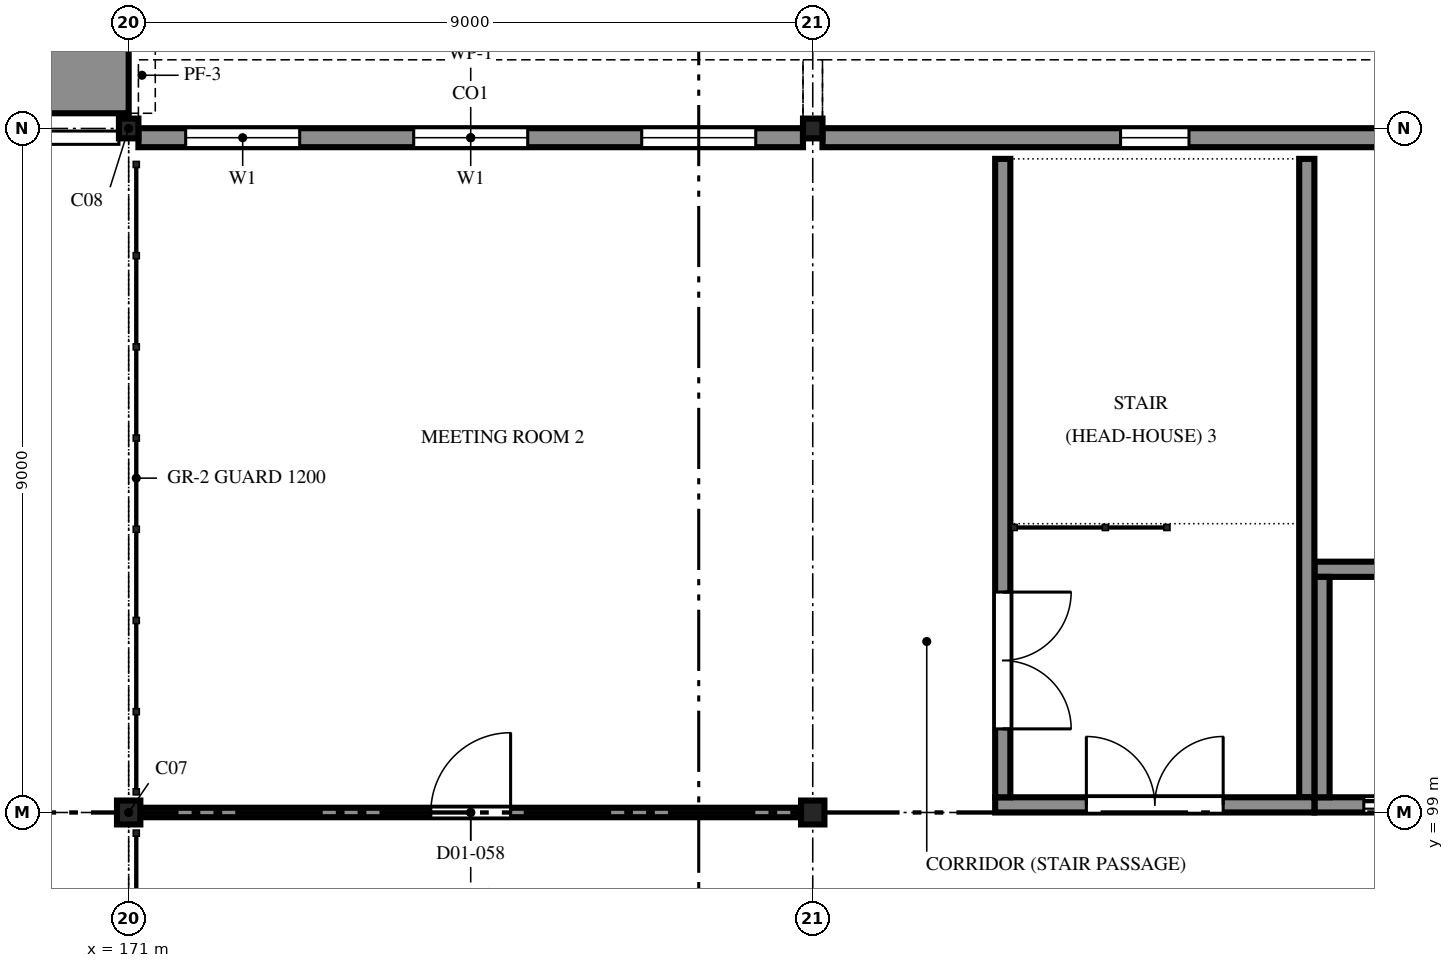
"""IFC4 building model, lengths in metres.
Left out: names, types, materials, properties, quantities, classifications, styles, units other than length and angle.
Written with IfcOpenShell. Run it as: python <this file> out.ifc"""

import sys

from ifc_helpers import new_model, si_unit, direction, frame, frame_2d, origin, origin_2d, place, context, subcontext, project, spatial, polyline, rectangle, i_section, outline, extrude, element, fill, save


model = new_model("IFC4")
c1 = context("Model", 3, precision=1e-05, world=origin(), true_north=direction((0.0, 1.0)))
c2 = subcontext(c1, "Body", "Model", "MODEL_VIEW")
j1 = project(units=[si_unit("LENGTHUNIT", "METRE"), si_unit("PLANEANGLEUNIT", "RADIAN")], contexts=[c1])
p1 = place(None, origin())
s1 = spatial("IfcSite", under=j1, at=p1, CompositionType="ELEMENT")
p2 = place(p1, origin())
s2 = spatial("IfcBuilding", under=s1, at=p2, CompositionType="ELEMENT")
p3 = place(p2, frame((0.0, 0.0, 7.5)))
s3 = spatial("IfcBuildingStorey", under=s2, at=p3, CompositionType="ELEMENT", Elevation=7.5)
p4 = place(p3, frame((171.0, 99.0, 0.0), z_axis=(0.0, 0.0, 1.0), x_axis=(1.0, 0.0, 0.0)))
e1 = element("IfcColumn", 1, at=p4, inside=s3, PredefinedType="COLUMN", context=c2, shape_type="SweptSolid", body=[
    extrude(i_section(OverallWidth=0.307, OverallDepth=0.314, WebThickness=0.012, FlangeThickness=0.019, FilletRadius=0.015, at=origin_2d()), origin(), (0.0, 0.0, 1.0), 4.2),
])
p5 = place(p3, frame((171.0, 108.0, 0.0), z_axis=(0.0, 0.0, 1.0), x_axis=(1.0, 0.0, 0.0)))
e2 = element("IfcColumn", 2, at=p5, inside=s3, PredefinedType="COLUMN", context=c2, shape_type="SweptSolid", body=[
    extrude(i_section(OverallWidth=0.256, OverallDepth=0.26, WebThickness=0.01, FlangeThickness=0.017, FilletRadius=0.013, at=origin_2d()), origin(), (0.0, 0.0, 1.0), 4.2),
])
p6 = place(p3, frame((180.0, 99.0, 0.0), z_axis=(0.0, 0.0, 1.0), x_axis=(1.0, 0.0, 0.0)))
e3 = element("IfcColumn", 3, at=p6, inside=s3, PredefinedType="COLUMN", context=c2, shape_type="SweptSolid", body=[
    extrude(i_section(OverallWidth=0.307, OverallDepth=0.314, WebThickness=0.012, FlangeThickness=0.019, FilletRadius=0.015, at=origin_2d()), origin(), (0.0, 0.0, 1.0), 4.2),
])
p7 = place(p3, frame((180.0, 108.0, 0.0), z_axis=(0.0, 0.0, 1.0), x_axis=(1.0, 0.0, 0.0)))
e4 = element("IfcColumn", 4, at=p7, inside=s3, PredefinedType="COLUMN", context=c2, shape_type="SweptSolid", body=[
    extrude(i_section(OverallWidth=0.256, OverallDepth=0.26, WebThickness=0.01, FlangeThickness=0.017, FilletRadius=0.013, at=origin_2d()), origin(), (0.0, 0.0, 1.0), 4.2),
])
p8 = place(p3, frame((171.128, 107.878, 0.0), z_axis=(0.0, 0.0, 1.0), x_axis=(1.0, 0.0, 0.0)))
e5 = element("IfcWall", 5, at=p8, inside=s3, PredefinedType="SOLIDWALL", context=c2, shape_type="SweptSolid", body=[
    extrude(rectangle(XDim=8.744, YDim=0.25, at=frame_2d((4.372, 0.0))), origin(), (0.0, 0.0, 1.0), 4.05),
])
p9 = place(p8, frame((0.622, 0.0, 0.9)))
e6 = element("IfcOpeningElement", 6, at=p9, cuts=e5, PredefinedType="OPENING", context=c2, shape_type="SweptSolid", body=[
    extrude(rectangle(XDim=1.5, YDim=2.4, at=frame_2d((0.75, 1.2))), frame((0.0, 0.135, 0.0), z_axis=(0.0, -1.0, 0.0), x_axis=(1.0, 0.0, 0.0)), (0.0, 0.0, 1.0), 0.27),
])
p10 = place(p8, frame((3.622, 0.0, 0.9)))
e7 = element("IfcOpeningElement", 7, at=p10, cuts=e5, PredefinedType="OPENING", context=c2, shape_type="SweptSolid", body=[
    extrude(rectangle(XDim=1.5, YDim=2.4, at=frame_2d((0.75, 1.2))), frame((0.0, 0.135, 0.0), z_axis=(0.0, -1.0, 0.0), x_axis=(1.0, 0.0, 0.0)), (0.0, 0.0, 1.0), 0.27),
])
p11 = place(p8, frame((6.622, 0.0, 0.9)))
e8 = element("IfcOpeningElement", 8, at=p11, cuts=e5, PredefinedType="OPENING", context=c2, shape_type="SweptSolid", body=[
    extrude(rectangle(XDim=1.5, YDim=2.4, at=frame_2d((0.75, 1.2))), frame((0.0, 0.135, 0.0), z_axis=(0.0, -1.0, 0.0), x_axis=(1.0, 0.0, 0.0)), (0.0, 0.0, 1.0), 0.27),
])
p12 = place(p3, frame((180.128, 107.878, 0.0), z_axis=(0.0, 0.0, 1.0), x_axis=(1.0, 0.0, 0.0)))
e9 = element("IfcWall", 9, at=p12, inside=s3, PredefinedType="SOLIDWALL", context=c2, shape_type="SweptSolid", body=[
    extrude(rectangle(XDim=8.744, YDim=0.25, at=frame_2d((4.372, 0.0))), origin(), (0.0, 0.0, 1.0), 4.05),
])
p13 = place(p12, frame((3.922, 0.0, 1.2)))
e10 = element("IfcOpeningElement", 10, at=p13, cuts=e9, PredefinedType="OPENING", context=c2, shape_type="SweptSolid", body=[
    extrude(rectangle(XDim=0.9, YDim=1.8, at=frame_2d((0.45, 0.9))), frame((0.0, 0.135, 0.0), z_axis=(0.0, -1.0, 0.0), x_axis=(1.0, 0.0, 0.0)), (0.0, 0.0, 1.0), 0.27),
])
p14 = place(p2, origin())
s4 = spatial("IfcBuildingStorey", under=s2, at=p14, CompositionType="ELEMENT", Elevation=0.0)
p15 = place(p14, frame((168.0, 108.7, -2.1), z_axis=(0.0, 0.0, 1.0), x_axis=(1.0, 0.0, 0.0)))
e11 = element("IfcWall", 11, at=p15, inside=s4, PredefinedType="SOLIDWALL", context=c2, shape_type="SweptSolid", body=[
    extrude(rectangle(XDim=3.0, YDim=1.0, at=frame_2d((1.5, 0.0))), origin(), (0.0, 0.0, 1.0), 26.1),
])
p16 = place(p3, frame((182.4, 99.1, -0.13), z_axis=(0.0, 0.0, 1.0), x_axis=(1.0, 0.0, 0.0)))
e12 = element("IfcWall", 12, at=p16, inside=s3, PredefinedType="SOLIDWALL", context=c2, shape_type="SweptSolid", body=[
    extrude(rectangle(XDim=4.2, YDim=0.2, at=frame_2d((2.1, 0.0))), origin(), (0.0, 0.0, 1.0), 3.72),
])
p17 = place(p16, frame((1.2, 0.0, 0.13)))
e13 = element("IfcOpeningElement", 13, at=p17, cuts=e12, PredefinedType="OPENING", context=c2, shape_type="SweptSolid", body=[
    extrude(rectangle(XDim=1.8, YDim=2.1, at=frame_2d((0.9, 1.05))), frame((0.0, 0.11, 0.0), z_axis=(0.0, -1.0, 0.0), x_axis=(1.0, 0.0, 0.0)), (0.0, 0.0, 1.0), 0.22),
])
p18 = place(p3, frame((182.5, 99.2, -0.13), z_axis=(0.0, 0.0, 1.0), x_axis=(0.0, 1.0, 0.0)))
e14 = element("IfcWall", 14, at=p18, inside=s3, PredefinedType="SOLIDWALL", context=c2, shape_type="SweptSolid", body=[
    extrude(rectangle(XDim=8.4, YDim=0.2, at=frame_2d((4.2, 0.0))), origin(), (0.0, 0.0, 1.0), 3.72),
])
p19 = place(p18, frame((0.9, 0.0, 0.13)))
e15 = element("IfcOpeningElement", 15, at=p19, cuts=e14, PredefinedType="OPENING", context=c2, shape_type="SweptSolid", body=[
    extrude(rectangle(XDim=1.8, YDim=2.1, at=frame_2d((0.9, 1.05))), frame((0.0, 0.11, 0.0), z_axis=(0.0, -1.0, 0.0), x_axis=(1.0, 0.0, 0.0)), (0.0, 0.0, 1.0), 0.22),
])
p20 = place(p3, frame((186.5, 99.2, -0.13), z_axis=(0.0, 0.0, 1.0), x_axis=(0.0, 1.0, 0.0)))
e16 = element("IfcWall", 16, at=p20, inside=s3, PredefinedType="SOLIDWALL", context=c2, shape_type="SweptSolid", body=[
    extrude(rectangle(XDim=8.4, YDim=0.2, at=frame_2d((4.2, 0.0))), origin(), (0.0, 0.0, 1.0), 3.72),
])
p21 = place(p3, frame((186.602, 99.1, 0.0), z_axis=(0.0, 0.0, 1.0), x_axis=(1.0, 0.0, 0.0)))
e17 = element("IfcWall", 17, at=p21, inside=s3, PredefinedType="SOLIDWALL", context=c2, shape_type="SweptSolid", body=[
    extrude(rectangle(XDim=2.398, YDim=0.2, at=frame_2d((1.199, 0.0))), origin(), (0.0, 0.0, 1.0), 3.516),
])
p22 = place(p21, frame((0.648, 0.0, 0.0)))
e18 = element("IfcOpeningElement", 18, at=p22, cuts=e17, PredefinedType="OPENING", context=c2, shape_type="SweptSolid", body=[
    extrude(rectangle(XDim=1.1, YDim=2.1, at=frame_2d((0.55, 1.05))), frame((0.0, 0.11, 0.0), z_axis=(0.0, -1.0, 0.0), x_axis=(1.0, 0.0, 0.0)), (0.0, 0.0, 1.0), 0.22),
])
p23 = place(p3, frame((186.602, 102.2, 0.0), z_axis=(0.0, 0.0, 1.0), x_axis=(1.0, 0.0, 0.0)))
e19 = element("IfcWall", 19, at=p23, inside=s3, PredefinedType="SOLIDWALL", context=c2, shape_type="SweptSolid", body=[
    extrude(rectangle(XDim=2.398, YDim=0.2, at=frame_2d((1.199, 0.0))), origin(), (0.0, 0.0, 1.0), 3.516),
])
p24 = place(p3, frame((186.7, 99.2, 0.0), z_axis=(0.0, 0.0, 1.0), x_axis=(0.0, 1.0, 0.0)))
e20 = element("IfcWall", 20, at=p24, inside=s3, PredefinedType="SOLIDWALL", context=c2, shape_type="SweptSolid", body=[
    extrude(rectangle(XDim=2.9, YDim=0.2, at=frame_2d((1.45, 0.0))), origin(), (0.0, 0.0, 1.0), 3.516),
])
p25 = place(p3, frame((171.154, 99.0, 0.0), z_axis=(0.0, 0.0, 1.0), x_axis=(1.0, 0.0, 0.0)))
e21 = element("IfcWall", 21, at=p25, inside=s3, PredefinedType="PARTITIONING", context=c2, shape_type="SweptSolid", body=[
    extrude(rectangle(XDim=8.692, YDim=0.125, at=frame_2d((4.346, 0.0))), origin(), (0.0, 0.0, 1.0), 3.307),
])
p26 = place(p25, frame((3.821, 0.0, 0.0)))
e22 = element("IfcOpeningElement", 22, at=p26, cuts=e21, PredefinedType="OPENING", context=c2, shape_type="SweptSolid", body=[
    extrude(rectangle(XDim=1.05, YDim=2.1, at=frame_2d((0.525, 1.05))), frame((0.0, 0.073, 0.0), z_axis=(0.0, -1.0, 0.0), x_axis=(1.0, 0.0, 0.0)), (0.0, 0.0, 1.0), 0.145),
])
p27 = place(p9, origin())
e23 = element("IfcWindow", 23, at=p27, inside=s3, PartitioningType="DOUBLE_PANEL_VERTICAL", PredefinedType="WINDOW", context=c2, shape_type="SweptSolid", body=[
    extrude(outline(polyline([(0.0, 0.0), (1.5, 0.0), (1.5, 2.4), (0.0, 2.4), (0.0, 0.0)]), holes=[polyline([(0.07, 0.07), (1.43, 0.07), (1.43, 2.33), (0.07, 2.33), (0.07, 0.07)])]), frame((0.0, 0.03, 0.0), z_axis=(0.0, -1.0, 0.0), x_axis=(1.0, 0.0, 0.0)), (0.0, 0.0, 1.0), 0.06),
    extrude(rectangle(XDim=0.04, YDim=2.26, at=frame_2d((0.75, 1.2))), frame((0.0, 0.022, 0.0), z_axis=(0.0, -1.0, 0.0), x_axis=(1.0, 0.0, 0.0)), (0.0, 0.0, 1.0), 0.044),
    extrude(outline(polyline([(0.07, 0.07), (0.73, 0.07), (0.73, 2.33), (0.07, 2.33), (0.07, 0.07)]), holes=[polyline([(0.1, 0.1), (0.7, 0.1), (0.7, 2.3), (0.1, 2.3), (0.1, 0.1)])]), frame((0.0, 0.022, 0.0), z_axis=(0.0, -1.0, 0.0), x_axis=(1.0, 0.0, 0.0)), (0.0, 0.0, 1.0), 0.045),
    extrude(rectangle(XDim=0.6, YDim=2.2, at=frame_2d((0.4, 1.2))), frame((0.0, 0.006, 0.0), z_axis=(0.0, -1.0, 0.0), x_axis=(1.0, 0.0, 0.0)), (0.0, 0.0, 1.0), 0.012),
    extrude(outline(polyline([(0.77, 0.07), (1.43, 0.07), (1.43, 2.33), (0.77, 2.33), (0.77, 0.07)]), holes=[polyline([(0.8, 0.1), (1.4, 0.1), (1.4, 2.3), (0.8, 2.3), (0.8, 0.1)])]), frame((0.0, 0.022, 0.0), z_axis=(0.0, -1.0, 0.0), x_axis=(1.0, 0.0, 0.0)), (0.0, 0.0, 1.0), 0.045),
    extrude(rectangle(XDim=0.6, YDim=2.2, at=frame_2d((1.1, 1.2))), frame((0.0, 0.006, 0.0), z_axis=(0.0, -1.0, 0.0), x_axis=(1.0, 0.0, 0.0)), (0.0, 0.0, 1.0), 0.012),
])
fill(e6, e23)
p28 = place(p10, origin())
e24 = element("IfcWindow", 24, at=p28, inside=s3, PartitioningType="DOUBLE_PANEL_VERTICAL", PredefinedType="WINDOW", context=c2, shape_type="SweptSolid", body=[
    extrude(outline(polyline([(0.0, 0.0), (1.5, 0.0), (1.5, 2.4), (0.0, 2.4), (0.0, 0.0)]), holes=[polyline([(0.07, 0.07), (1.43, 0.07), (1.43, 2.33), (0.07, 2.33), (0.07, 0.07)])]), frame((0.0, 0.03, 0.0), z_axis=(0.0, -1.0, 0.0), x_axis=(1.0, 0.0, 0.0)), (0.0, 0.0, 1.0), 0.06),
    extrude(rectangle(XDim=0.04, YDim=2.26, at=frame_2d((0.75, 1.2))), frame((0.0, 0.022, 0.0), z_axis=(0.0, -1.0, 0.0), x_axis=(1.0, 0.0, 0.0)), (0.0, 0.0, 1.0), 0.044),
    extrude(outline(polyline([(0.07, 0.07), (0.73, 0.07), (0.73, 2.33), (0.07, 2.33), (0.07, 0.07)]), holes=[polyline([(0.1, 0.1), (0.7, 0.1), (0.7, 2.3), (0.1, 2.3), (0.1, 0.1)])]), frame((0.0, 0.022, 0.0), z_axis=(0.0, -1.0, 0.0), x_axis=(1.0, 0.0, 0.0)), (0.0, 0.0, 1.0), 0.045),
    extrude(rectangle(XDim=0.6, YDim=2.2, at=frame_2d((0.4, 1.2))), frame((0.0, 0.006, 0.0), z_axis=(0.0, -1.0, 0.0), x_axis=(1.0, 0.0, 0.0)), (0.0, 0.0, 1.0), 0.012),
    extrude(outline(polyline([(0.77, 0.07), (1.43, 0.07), (1.43, 2.33), (0.77, 2.33), (0.77, 0.07)]), holes=[polyline([(0.8, 0.1), (1.4, 0.1), (1.4, 2.3), (0.8, 2.3), (0.8, 0.1)])]), frame((0.0, 0.022, 0.0), z_axis=(0.0, -1.0, 0.0), x_axis=(1.0, 0.0, 0.0)), (0.0, 0.0, 1.0), 0.045),
    extrude(rectangle(XDim=0.6, YDim=2.2, at=frame_2d((1.1, 1.2))), frame((0.0, 0.006, 0.0), z_axis=(0.0, -1.0, 0.0), x_axis=(1.0, 0.0, 0.0)), (0.0, 0.0, 1.0), 0.012),
])
fill(e7, e24)
p29 = place(p11, origin())
e25 = element("IfcWindow", 25, at=p29, inside=s3, PartitioningType="DOUBLE_PANEL_VERTICAL", PredefinedType="WINDOW", context=c2, shape_type="SweptSolid", body=[
    extrude(outline(polyline([(0.0, 0.0), (1.5, 0.0), (1.5, 2.4), (0.0, 2.4), (0.0, 0.0)]), holes=[polyline([(0.07, 0.07), (1.43, 0.07), (1.43, 2.33), (0.07, 2.33), (0.07, 0.07)])]), frame((0.0, 0.03, 0.0), z_axis=(0.0, -1.0, 0.0), x_axis=(1.0, 0.0, 0.0)), (0.0, 0.0, 1.0), 0.06),
    extrude(rectangle(XDim=0.04, YDim=2.26, at=frame_2d((0.75, 1.2))), frame((0.0, 0.022, 0.0), z_axis=(0.0, -1.0, 0.0), x_axis=(1.0, 0.0, 0.0)), (0.0, 0.0, 1.0), 0.044),
    extrude(outline(polyline([(0.07, 0.07), (0.73, 0.07), (0.73, 2.33), (0.07, 2.33), (0.07, 0.07)]), holes=[polyline([(0.1, 0.1), (0.7, 0.1), (0.7, 2.3), (0.1, 2.3), (0.1, 0.1)])]), frame((0.0, 0.022, 0.0), z_axis=(0.0, -1.0, 0.0), x_axis=(1.0, 0.0, 0.0)), (0.0, 0.0, 1.0), 0.045),
    extrude(rectangle(XDim=0.6, YDim=2.2, at=frame_2d((0.4, 1.2))), frame((0.0, 0.006, 0.0), z_axis=(0.0, -1.0, 0.0), x_axis=(1.0, 0.0, 0.0)), (0.0, 0.0, 1.0), 0.012),
    extrude(outline(polyline([(0.77, 0.07), (1.43, 0.07), (1.43, 2.33), (0.77, 2.33), (0.77, 0.07)]), holes=[polyline([(0.8, 0.1), (1.4, 0.1), (1.4, 2.3), (0.8, 2.3), (0.8, 0.1)])]), frame((0.0, 0.022, 0.0), z_axis=(0.0, -1.0, 0.0), x_axis=(1.0, 0.0, 0.0)), (0.0, 0.0, 1.0), 0.045),
    extrude(rectangle(XDim=0.6, YDim=2.2, at=frame_2d((1.1, 1.2))), frame((0.0, 0.006, 0.0), z_axis=(0.0, -1.0, 0.0), x_axis=(1.0, 0.0, 0.0)), (0.0, 0.0, 1.0), 0.012),
])
fill(e8, e25)
p30 = place(p13, origin())
e26 = element("IfcWindow", 26, at=p30, inside=s3, PartitioningType="SINGLE_PANEL", PredefinedType="WINDOW", context=c2, shape_type="SweptSolid", body=[
    extrude(outline(polyline([(0.0, 0.0), (0.9, 0.0), (0.9, 1.8), (0.0, 1.8), (0.0, 0.0)]), holes=[polyline([(0.07, 0.07), (0.83, 0.07), (0.83, 1.73), (0.07, 1.73), (0.07, 0.07)])]), frame((0.0, 0.03, 0.0), z_axis=(0.0, -1.0, 0.0), x_axis=(1.0, 0.0, 0.0)), (0.0, 0.0, 1.0), 0.06),
    extrude(outline(polyline([(0.07, 0.07), (0.83, 0.07), (0.83, 1.73), (0.07, 1.73), (0.07, 0.07)]), holes=[polyline([(0.1, 0.1), (0.8, 0.1), (0.8, 1.7), (0.1, 1.7), (0.1, 0.1)])]), frame((0.0, 0.022, 0.0), z_axis=(0.0, -1.0, 0.0), x_axis=(1.0, 0.0, 0.0)), (0.0, 0.0, 1.0), 0.045),
    extrude(rectangle(XDim=0.7, YDim=1.6, at=frame_2d((0.45, 0.9))), frame((0.0, 0.006, 0.0), z_axis=(0.0, -1.0, 0.0), x_axis=(1.0, 0.0, 0.0)), (0.0, 0.0, 1.0), 0.012),
])
fill(e10, e26)
p31 = place(p22, origin())
e27 = element("IfcDoor", 27, at=p31, inside=s3, OperationType="SLIDING_TO_LEFT", PredefinedType="DOOR", context=c2, shape_type="SweptSolid", body=[
    extrude(outline(polyline([(0.0, 0.0), (0.07, 0.0), (0.07, 2.03), (1.03, 2.03), (1.03, 0.0), (1.1, 0.0), (1.1, 2.1), (0.0, 2.1), (0.0, 0.0)])), frame((0.0, 0.025, 0.0), z_axis=(0.0, -1.0, 0.0), x_axis=(1.0, 0.0, 0.0)), (0.0, 0.0, 1.0), 0.05),
    extrude(rectangle(XDim=0.524, YDim=2.016, at=frame_2d((0.336, 1.018))), frame((0.0, 0.018, 0.0), z_axis=(0.0, -1.0, 0.0), x_axis=(1.0, 0.0, 0.0)), (0.0, 0.0, 1.0), 0.016),
    extrude(rectangle(XDim=0.52, YDim=2.016, at=frame_2d((0.766, 1.018))), frame((0.0, -0.002, 0.0), z_axis=(0.0, -1.0, 0.0), x_axis=(1.0, 0.0, 0.0)), (0.0, 0.0, 1.0), 0.016),
])
fill(e18, e27)
p32 = place(p26, origin())
e28 = element("IfcDoor", 28, at=p32, inside=s3, OperationType="SINGLE_SWING_RIGHT", PredefinedType="DOOR", context=c2, shape_type="SweptSolid", body=[
    extrude(outline(polyline([(0.0, 0.0), (0.07, 0.0), (0.07, 2.03), (0.98, 2.03), (0.98, 0.0), (1.05, 0.0), (1.05, 2.1), (0.0, 2.1), (0.0, 0.0)])), frame((0.0, 0.025, 0.0), z_axis=(0.0, -1.0, 0.0), x_axis=(1.0, 0.0, 0.0)), (0.0, 0.0, 1.0), 0.05),
    extrude(outline(polyline([(0.074, 0.01), (0.976, 0.01), (0.976, 2.026), (0.074, 2.026), (0.074, 0.01)]), holes=[polyline([(0.194, 0.16), (0.856, 0.16), (0.856, 1.01), (0.194, 1.01), (0.194, 0.16)]), polyline([(0.375, 1.16), (0.675, 1.16), (0.675, 1.76), (0.375, 1.76), (0.375, 1.16)])]), frame((0.0, 0.017, 0.0), z_axis=(0.0, -1.0, 0.0), x_axis=(1.0, 0.0, 0.0)), (0.0, 0.0, 1.0), 0.035),
    extrude(rectangle(XDim=0.662, YDim=0.85, at=frame_2d((0.525, 0.585))), frame((0.0, 0.009, 0.0), z_axis=(0.0, -1.0, 0.0), x_axis=(1.0, 0.0, 0.0)), (0.0, 0.0, 1.0), 0.017),
    extrude(rectangle(XDim=0.3, YDim=0.6, at=frame_2d((0.525, 1.46))), frame((0.0, 0.006, 0.0), z_axis=(0.0, -1.0, 0.0), x_axis=(1.0, 0.0, 0.0)), (0.0, 0.0, 1.0), 0.012),
])
fill(e22, e28)
p33 = place(p19, frame((1.8, 0.0, 0.0), z_axis=(0.0, 0.0, 1.0), x_axis=(-1.0, 0.0, 0.0)))
e29 = element("IfcDoor", 29, at=p33, inside=s3, OperationType="DOUBLE_DOOR_SINGLE_SWING", PredefinedType="DOOR", context=c2, shape_type="SweptSolid", body=[
    extrude(outline(polyline([(0.0, 0.0), (0.07, 0.0), (0.07, 2.03), (1.73, 2.03), (1.73, 0.0), (1.8, 0.0), (1.8, 2.1), (0.0, 2.1), (0.0, 0.0)])), frame((0.0, 0.025, 0.0), z_axis=(0.0, -1.0, 0.0), x_axis=(1.0, 0.0, 0.0)), (0.0, 0.0, 1.0), 0.05),
    extrude(outline(polyline([(0.074, 0.01), (0.897, 0.01), (0.897, 2.026), (0.074, 2.026), (0.074, 0.01)]), holes=[polyline([(0.194, 0.16), (0.777, 0.16), (0.777, 1.01), (0.194, 1.01), (0.194, 0.16)]), polyline([(0.335, 1.16), (0.635, 1.16), (0.635, 1.76), (0.335, 1.76), (0.335, 1.16)])]), frame((0.0, 0.017, 0.0), z_axis=(0.0, -1.0, 0.0), x_axis=(1.0, 0.0, 0.0)), (0.0, 0.0, 1.0), 0.035),
    extrude(rectangle(XDim=0.583, YDim=0.85, at=frame_2d((0.485, 0.585))), frame((0.0, 0.009, 0.0), z_axis=(0.0, -1.0, 0.0), x_axis=(1.0, 0.0, 0.0)), (0.0, 0.0, 1.0), 0.017),
    extrude(rectangle(XDim=0.3, YDim=0.6, at=frame_2d((0.485, 1.46))), frame((0.0, 0.006, 0.0), z_axis=(0.0, -1.0, 0.0), x_axis=(1.0, 0.0, 0.0)), (0.0, 0.0, 1.0), 0.012),
    extrude(outline(polyline([(0.903, 0.01), (1.726, 0.01), (1.726, 2.026), (0.903, 2.026), (0.903, 0.01)]), holes=[polyline([(1.023, 0.16), (1.606, 0.16), (1.606, 1.01), (1.023, 1.01), (1.023, 0.16)]), polyline([(1.165, 1.16), (1.465, 1.16), (1.465, 1.76), (1.165, 1.76), (1.165, 1.16)])]), frame((0.0, 0.017, 0.0), z_axis=(0.0, -1.0, 0.0), x_axis=(1.0, 0.0, 0.0)), (0.0, 0.0, 1.0), 0.035),
    extrude(rectangle(XDim=0.583, YDim=0.85, at=frame_2d((1.314, 0.585))), frame((0.0, 0.009, 0.0), z_axis=(0.0, -1.0, 0.0), x_axis=(1.0, 0.0, 0.0)), (0.0, 0.0, 1.0), 0.017),
    extrude(rectangle(XDim=0.3, YDim=0.6, at=frame_2d((1.314, 1.46))), frame((0.0, 0.006, 0.0), z_axis=(0.0, -1.0, 0.0), x_axis=(1.0, 0.0, 0.0)), (0.0, 0.0, 1.0), 0.012),
])
fill(e15, e29)
p34 = place(p17, origin())
e30 = element("IfcDoor", 30, at=p34, inside=s3, OperationType="DOUBLE_DOOR_SINGLE_SWING", PredefinedType="DOOR", context=c2, shape_type="SweptSolid", body=[
    extrude(outline(polyline([(0.0, 0.0), (0.07, 0.0), (0.07, 2.03), (1.73, 2.03), (1.73, 0.0), (1.8, 0.0), (1.8, 2.1), (0.0, 2.1), (0.0, 0.0)])), frame((0.0, 0.025, 0.0), z_axis=(0.0, -1.0, 0.0), x_axis=(1.0, 0.0, 0.0)), (0.0, 0.0, 1.0), 0.05),
    extrude(outline(polyline([(0.074, 0.01), (0.897, 0.01), (0.897, 2.026), (0.074, 2.026), (0.074, 0.01)]), holes=[polyline([(0.194, 0.16), (0.777, 0.16), (0.777, 1.01), (0.194, 1.01), (0.194, 0.16)]), polyline([(0.335, 1.16), (0.635, 1.16), (0.635, 1.76), (0.335, 1.76), (0.335, 1.16)])]), frame((0.0, 0.017, 0.0), z_axis=(0.0, -1.0, 0.0), x_axis=(1.0, 0.0, 0.0)), (0.0, 0.0, 1.0), 0.035),
    extrude(rectangle(XDim=0.583, YDim=0.85, at=frame_2d((0.485, 0.585))), frame((0.0, 0.009, 0.0), z_axis=(0.0, -1.0, 0.0), x_axis=(1.0, 0.0, 0.0)), (0.0, 0.0, 1.0), 0.017),
    extrude(rectangle(XDim=0.3, YDim=0.6, at=frame_2d((0.485, 1.46))), frame((0.0, 0.006, 0.0), z_axis=(0.0, -1.0, 0.0), x_axis=(1.0, 0.0, 0.0)), (0.0, 0.0, 1.0), 0.012),
    extrude(outline(polyline([(0.903, 0.01), (1.726, 0.01), (1.726, 2.026), (0.903, 2.026), (0.903, 0.01)]), holes=[polyline([(1.023, 0.16), (1.606, 0.16), (1.606, 1.01), (1.023, 1.01), (1.023, 0.16)]), polyline([(1.165, 1.16), (1.465, 1.16), (1.465, 1.76), (1.165, 1.76), (1.165, 1.16)])]), frame((0.0, 0.017, 0.0), z_axis=(0.0, -1.0, 0.0), x_axis=(1.0, 0.0, 0.0)), (0.0, 0.0, 1.0), 0.035),
    extrude(rectangle(XDim=0.583, YDim=0.85, at=frame_2d((1.314, 0.585))), frame((0.0, 0.009, 0.0), z_axis=(0.0, -1.0, 0.0), x_axis=(1.0, 0.0, 0.0)), (0.0, 0.0, 1.0), 0.017),
    extrude(rectangle(XDim=0.3, YDim=0.6, at=frame_2d((1.314, 1.46))), frame((0.0, 0.006, 0.0), z_axis=(0.0, -1.0, 0.0), x_axis=(1.0, 0.0, 0.0)), (0.0, 0.0, 1.0), 0.012),
])
fill(e13, e30)
save(model, sys.argv[1])
